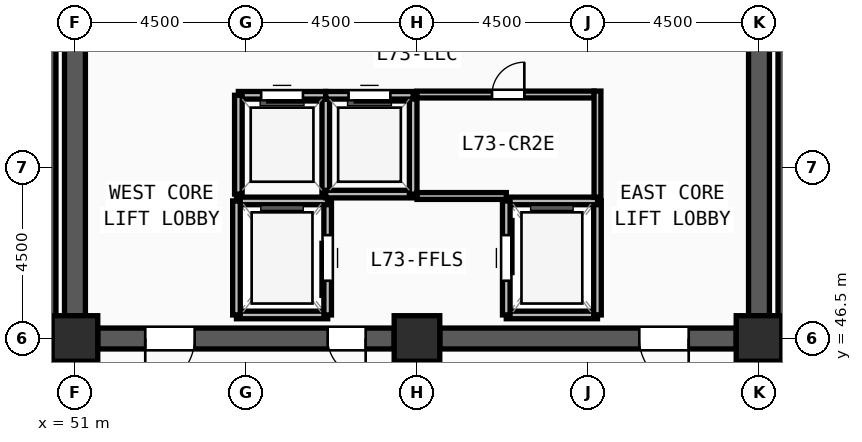
"""IFC4 building model, lengths in metres.
Left out: names, types, materials, properties, quantities, classifications, styles, units other than length and angle.
Written with IfcOpenShell. Run it as: python <this file> out.ifc"""

import sys

from ifc_helpers import new_model, si_unit, direction, frame, frame_2d, origin, origin_2d, place, context, subcontext, project, spatial, rectangle, extrude, source, transform, mapped, element, fill, save


model = new_model("IFC4")
c1 = context("Model", 3, precision=1e-05, world=origin(), true_north=direction((0.0, 1.0)))
c2 = subcontext(c1, "Body", "Model", "MODEL_VIEW")
j1 = project(units=[si_unit("LENGTHUNIT", "METRE"), si_unit("PLANEANGLEUNIT", "RADIAN")], contexts=[c1])
p1 = place(None, origin())
s1 = spatial("IfcSite", under=j1, at=p1, CompositionType="ELEMENT")
p2 = place(p1, origin())
s2 = spatial("IfcBuilding", under=s1, at=p2, CompositionType="ELEMENT")
p3 = place(p2, frame((0.0, 0.0, 282.0)))
s3 = spatial("IfcBuildingStorey", under=s2, at=p3, CompositionType="ELEMENT", Elevation=282.0)
m1 = source(origin(), c2, "Body", "SweptSolid", [
    extrude(rectangle(XDim=1.2, YDim=1.2, at=origin_2d()), origin(), (0.0, 0.0, 1.0), 4.5),
])
for number, where, z_axis, x_axis in (
    (1, (51.0, 46.5, 0.0), (0.0, 0.0, 1.0), (1.0, 0.0, 0.0)),
    (2, (60.0, 46.5, 0.0), (0.0, 0.0, 1.0), (1.0, 0.0, 0.0)),
    (3, (69.0, 46.5, 0.0), (0.0, 0.0, 1.0), (1.0, 0.0, 0.0)),
):
    element("IfcColumn", number, at=place(p3, frame(where, z_axis=z_axis, x_axis=x_axis)), inside=s3, PredefinedType="COLUMN", context=c2, shape_type="MappedRepresentation", body=[
        mapped(m1, transform((0.0, 0.0, 0.0), x_axis=(1.0, 0.0, 0.0), y_axis=(0.0, 1.0, 0.0), z_axis=(0.0, 0.0, 1.0), scale=1.0)),
    ])
p4 = place(p3, frame((69.0, 60.9, 0.0), z_axis=(0.0, 0.0, 1.0), x_axis=(0.0, -1.0, 0.0)))
e4 = element("IfcWall", 4, at=p4, inside=s3, PredefinedType="SHEAR", context=c2, shape_type="SweptSolid", body=[
    extrude(rectangle(XDim=13.8, YDim=0.55, at=frame_2d((6.9, 0.0))), origin(), (0.0, 0.0, 1.0), 4.32),
])
m2 = source(origin(), c2, "Body", "SweptSolid", [
    extrude(rectangle(XDim=1.2, YDim=2.2, at=frame_2d((0.6, 1.1))), frame((0.0, 0.285, 0.0), z_axis=(0.0, -1.0, 0.0), x_axis=(1.0, 0.0, 0.0)), (0.0, 0.0, 1.0), 0.57),
])
p5 = place(p4, frame((1.35, 0.0, 0.0)))
e5 = element("IfcOpeningElement", 5, at=p5, cuts=e4, PredefinedType="OPENING", context=c2, shape_type="MappedRepresentation", body=[
    mapped(m2, transform((0.0, 0.0, 0.0), x_axis=(1.0, 0.0, 0.0), y_axis=(0.0, 1.0, 0.0), z_axis=(0.0, 0.0, 1.0), scale=1.0)),
])
p6 = place(p3, frame((68.4, 46.5, 0.0), z_axis=(0.0, 0.0, 1.0), x_axis=(-1.0, 0.0, 0.0)))
e6 = element("IfcWall", 6, at=p6, inside=s3, PredefinedType="SHEAR", context=c2, shape_type="SweptSolid", body=[
    extrude(rectangle(XDim=7.8, YDim=0.55, at=frame_2d((3.9, 0.0))), origin(), (0.0, 0.0, 1.0), 4.32),
])
m3 = source(origin(), c2, "Body", "SweptSolid", [
    extrude(rectangle(XDim=1.3, YDim=2.2, at=frame_2d((0.65, 1.1))), frame((0.0, 0.285, 0.0), z_axis=(0.0, -1.0, 0.0), x_axis=(1.0, 0.0, 0.0)), (0.0, 0.0, 1.0), 0.57),
])
p7 = place(p6, frame((1.25, 0.0, 0.0)))
e7 = element("IfcOpeningElement", 7, at=p7, cuts=e6, PredefinedType="OPENING", context=c2, shape_type="MappedRepresentation", body=[
    mapped(m3, transform((0.0, 0.0, 0.0), x_axis=(1.0, 0.0, 0.0), y_axis=(0.0, 1.0, 0.0), z_axis=(0.0, 0.0, 1.0), scale=1.0)),
])
p8 = place(p3, frame((59.4, 46.5, 0.0), z_axis=(0.0, 0.0, 1.0), x_axis=(-1.0, 0.0, 0.0)))
e8 = element("IfcWall", 8, at=p8, inside=s3, PredefinedType="SHEAR", context=c2, shape_type="SweptSolid", body=[
    extrude(rectangle(XDim=7.8, YDim=0.55, at=frame_2d((3.9, 0.0))), origin(), (0.0, 0.0, 1.0), 4.32),
])
p9 = place(p8, frame((5.25, 0.0, 0.0)))
e9 = element("IfcOpeningElement", 9, at=p9, cuts=e8, PredefinedType="OPENING", context=c2, shape_type="MappedRepresentation", body=[
    mapped(m3, transform((0.0, 0.0, 0.0), x_axis=(1.0, 0.0, 0.0), y_axis=(0.0, 1.0, 0.0), z_axis=(0.0, 0.0, 1.0), scale=1.0)),
])
m4 = source(origin(), c2, "Body", "SweptSolid", [
    extrude(rectangle(XDim=1.0, YDim=2.2, at=frame_2d((0.5, 1.1))), frame((0.0, 0.285, 0.0), z_axis=(0.0, -1.0, 0.0), x_axis=(1.0, 0.0, 0.0)), (0.0, 0.0, 1.0), 0.57),
])
p10 = place(p8, frame((0.75, 0.0, 0.0)))
e10 = element("IfcOpeningElement", 10, at=p10, cuts=e8, PredefinedType="OPENING", context=c2, shape_type="MappedRepresentation", body=[
    mapped(m4, transform((0.0, 0.0, 0.0), x_axis=(1.0, 0.0, 0.0), y_axis=(0.0, 1.0, 0.0), z_axis=(0.0, 0.0, 1.0), scale=1.0)),
])
p11 = place(p3, frame((51.0, 47.1, 0.0), z_axis=(0.0, 0.0, 1.0), x_axis=(0.0, 1.0, 0.0)))
e11 = element("IfcWall", 11, at=p11, inside=s3, PredefinedType="SHEAR", context=c2, shape_type="SweptSolid", body=[
    extrude(rectangle(XDim=13.8, YDim=0.55, at=frame_2d((6.9, 0.0))), origin(), (0.0, 0.0, 1.0), 4.32),
])
m5 = source(origin(), c2, "Body", "SweptSolid", [
    extrude(rectangle(XDim=1.1, YDim=2.2, at=frame_2d((0.55, 1.1))), frame((0.0, 0.285, 0.0), z_axis=(0.0, -1.0, 0.0), x_axis=(1.0, 0.0, 0.0)), (0.0, 0.0, 1.0), 0.57),
])
p12 = place(p11, frame((11.8, 0.0, 0.0)))
e12 = element("IfcOpeningElement", 12, at=p12, cuts=e11, PredefinedType="OPENING", context=c2, shape_type="MappedRepresentation", body=[
    mapped(m5, transform((0.0, 0.0, 0.0), x_axis=(1.0, 0.0, 0.0), y_axis=(0.0, 1.0, 0.0), z_axis=(0.0, 0.0, 1.0), scale=1.0)),
])
for number, where, z_axis, x_axis in (
    (13, (50.38, 46.7, 0.0), (0.0, 0.0, 1.0), (0.0, 1.0, 0.0)),
    (14, (69.62, 54.52, 0.0), (0.0, 0.0, 1.0), (0.0, -1.0, 0.0)),
):
    element("IfcWall", number, at=place(p3, frame(where, z_axis=z_axis, x_axis=x_axis)), inside=s3, PredefinedType="SOLIDWALL", context=c2, shape_type="SweptSolid", body=[
        extrude(rectangle(XDim=7.82, YDim=0.24, at=frame_2d((3.91, 0.0))), origin(), (0.0, 0.0, 1.0), 4.32),
    ])
p13 = place(p3, frame((55.25, 47.12, 0.0), z_axis=(0.0, 0.0, 1.0), x_axis=(1.0, 0.0, 0.0)))
e15 = element("IfcWall", 15, at=p13, inside=s3, PredefinedType="SOLIDWALL", context=c2, shape_type="SweptSolid", body=[
    extrude(rectangle(XDim=2.4, YDim=0.2, at=frame_2d((1.2, 0.0))), origin(), (0.0, 0.0, 1.0), 4.32),
])
p14 = place(p3, frame((57.65, 47.12, 0.0), z_axis=(0.0, 0.0, 1.0), x_axis=(0.0, 1.0, 0.0)))
e16 = element("IfcWall", 16, at=p14, inside=s3, PredefinedType="SOLIDWALL", context=c2, shape_type="SweptSolid", body=[
    extrude(rectangle(XDim=3.0, YDim=0.2, at=frame_2d((1.5, 0.0))), origin(), (0.0, 0.0, 1.0), 4.32),
])
m6 = source(origin(), c2, "Body", "SweptSolid", [
    extrude(rectangle(XDim=1.2, YDim=2.3, at=frame_2d((0.6, 1.15))), frame((0.0, 0.11, 0.0), z_axis=(0.0, -1.0, 0.0), x_axis=(1.0, 0.0, 0.0)), (0.0, 0.0, 1.0), 0.22),
])
p15 = place(p14, frame((0.9, 0.0, 0.0)))
e17 = element("IfcOpeningElement", 17, at=p15, cuts=e16, PredefinedType="OPENING", context=c2, shape_type="MappedRepresentation", body=[
    mapped(m6, transform((0.0, 0.0, 0.0), x_axis=(1.0, 0.0, 0.0), y_axis=(0.0, 1.0, 0.0), z_axis=(0.0, 0.0, 1.0), scale=1.0)),
])
p16 = place(p3, frame((57.65, 50.12, 0.0), z_axis=(0.0, 0.0, 1.0), x_axis=(-1.0, 0.0, 0.0)))
e18 = element("IfcWall", 18, at=p16, inside=s3, PredefinedType="SOLIDWALL", context=c2, shape_type="SweptSolid", body=[
    extrude(rectangle(XDim=2.4, YDim=0.2, at=frame_2d((1.2, 0.0))), origin(), (0.0, 0.0, 1.0), 4.32),
])
p17 = place(p3, frame((55.25, 50.12, 0.0), z_axis=(0.0, 0.0, 1.0), x_axis=(0.0, -1.0, 0.0)))
e19 = element("IfcWall", 19, at=p17, inside=s3, PredefinedType="SOLIDWALL", context=c2, shape_type="SweptSolid", body=[
    extrude(rectangle(XDim=3.0, YDim=0.2, at=frame_2d((1.5, 0.0))), origin(), (0.0, 0.0, 1.0), 4.32),
])
p18 = place(p3, frame((62.35, 47.12, 0.0), z_axis=(0.0, 0.0, 1.0), x_axis=(1.0, 0.0, 0.0)))
e20 = element("IfcWall", 20, at=p18, inside=s3, PredefinedType="SOLIDWALL", context=c2, shape_type="SweptSolid", body=[
    extrude(rectangle(XDim=2.4, YDim=0.2, at=frame_2d((1.2, 0.0))), origin(), (0.0, 0.0, 1.0), 4.32),
])
p19 = place(p3, frame((64.75, 47.12, 0.0), z_axis=(0.0, 0.0, 1.0), x_axis=(0.0, 1.0, 0.0)))
e21 = element("IfcWall", 21, at=p19, inside=s3, PredefinedType="SOLIDWALL", context=c2, shape_type="SweptSolid", body=[
    extrude(rectangle(XDim=3.0, YDim=0.2, at=frame_2d((1.5, 0.0))), origin(), (0.0, 0.0, 1.0), 4.32),
])
p20 = place(p3, frame((64.75, 50.12, 0.0), z_axis=(0.0, 0.0, 1.0), x_axis=(-1.0, 0.0, 0.0)))
e22 = element("IfcWall", 22, at=p20, inside=s3, PredefinedType="SOLIDWALL", context=c2, shape_type="SweptSolid", body=[
    extrude(rectangle(XDim=2.4, YDim=0.2, at=frame_2d((1.2, 0.0))), origin(), (0.0, 0.0, 1.0), 4.32),
])
p21 = place(p3, frame((62.35, 50.12, 0.0), z_axis=(0.0, 0.0, 1.0), x_axis=(0.0, -1.0, 0.0)))
e23 = element("IfcWall", 23, at=p21, inside=s3, PredefinedType="SOLIDWALL", context=c2, shape_type="SweptSolid", body=[
    extrude(rectangle(XDim=3.0, YDim=0.2, at=frame_2d((1.5, 0.0))), origin(), (0.0, 0.0, 1.0), 4.32),
])
p22 = place(p21, frame((0.9, 0.0, 0.0)))
e24 = element("IfcOpeningElement", 24, at=p22, cuts=e23, PredefinedType="OPENING", context=c2, shape_type="MappedRepresentation", body=[
    mapped(m6, transform((0.0, 0.0, 0.0), x_axis=(1.0, 0.0, 0.0), y_axis=(0.0, 1.0, 0.0), z_axis=(0.0, 0.0, 1.0), scale=1.0)),
])
p23 = place(p3, frame((57.6, 50.3, 0.0), z_axis=(0.0, 0.0, 1.0), x_axis=(0.0, 1.0, 0.0)))
e25 = element("IfcWall", 25, at=p23, inside=s3, PredefinedType="SOLIDWALL", context=c2, shape_type="SweptSolid", body=[
    extrude(rectangle(XDim=2.6, YDim=0.2, at=frame_2d((1.3, 0.0))), origin(), (0.0, 0.0, 1.0), 4.32),
])
p24 = place(p3, frame((57.6, 52.9, 0.0), z_axis=(0.0, 0.0, 1.0), x_axis=(-1.0, 0.0, 0.0)))
e26 = element("IfcWall", 26, at=p24, inside=s3, PredefinedType="SOLIDWALL", context=c2, shape_type="SweptSolid", body=[
    extrude(rectangle(XDim=2.3, YDim=0.2, at=frame_2d((1.15, 0.0))), origin(), (0.0, 0.0, 1.0), 4.32),
])
m7 = source(origin(), c2, "Body", "SweptSolid", [
    extrude(rectangle(XDim=1.1, YDim=2.2, at=frame_2d((0.55, 1.1))), frame((0.0, 0.11, 0.0), z_axis=(0.0, -1.0, 0.0), x_axis=(1.0, 0.0, 0.0)), (0.0, 0.0, 1.0), 0.22),
])
p25 = place(p24, frame((0.6, 0.0, 0.0)))
e27 = element("IfcOpeningElement", 27, at=p25, cuts=e26, PredefinedType="OPENING", context=c2, shape_type="MappedRepresentation", body=[
    mapped(m7, transform((0.0, 0.0, 0.0), x_axis=(1.0, 0.0, 0.0), y_axis=(0.0, 1.0, 0.0), z_axis=(0.0, 0.0, 1.0), scale=1.0)),
])
p26 = place(p3, frame((55.3, 52.9, 0.0), z_axis=(0.0, 0.0, 1.0), x_axis=(0.0, -1.0, 0.0)))
e28 = element("IfcWall", 28, at=p26, inside=s3, PredefinedType="SOLIDWALL", context=c2, shape_type="SweptSolid", body=[
    extrude(rectangle(XDim=2.6, YDim=0.2, at=frame_2d((1.3, 0.0))), origin(), (0.0, 0.0, 1.0), 4.32),
])
p27 = place(p3, frame((57.6, 50.3, 0.0), z_axis=(0.0, 0.0, 1.0), x_axis=(1.0, 0.0, 0.0)))
e29 = element("IfcWall", 29, at=p27, inside=s3, PredefinedType="SOLIDWALL", context=c2, shape_type="SweptSolid", body=[
    extrude(rectangle(XDim=2.3, YDim=0.2, at=frame_2d((1.15, 0.0))), origin(), (0.0, 0.0, 1.0), 4.32),
])
p28 = place(p3, frame((59.9, 50.3, 0.0), z_axis=(0.0, 0.0, 1.0), x_axis=(0.0, 1.0, 0.0)))
e30 = element("IfcWall", 30, at=p28, inside=s3, PredefinedType="SOLIDWALL", context=c2, shape_type="SweptSolid", body=[
    extrude(rectangle(XDim=2.6, YDim=0.2, at=frame_2d((1.3, 0.0))), origin(), (0.0, 0.0, 1.0), 4.32),
])
p29 = place(p3, frame((59.9, 52.9, 0.0), z_axis=(0.0, 0.0, 1.0), x_axis=(-1.0, 0.0, 0.0)))
e31 = element("IfcWall", 31, at=p29, inside=s3, PredefinedType="SOLIDWALL", context=c2, shape_type="SweptSolid", body=[
    extrude(rectangle(XDim=2.3, YDim=0.2, at=frame_2d((1.15, 0.0))), origin(), (0.0, 0.0, 1.0), 4.32),
])
p30 = place(p29, frame((0.6, 0.0, 0.0)))
e32 = element("IfcOpeningElement", 32, at=p30, cuts=e31, PredefinedType="OPENING", context=c2, shape_type="MappedRepresentation", body=[
    mapped(m7, transform((0.0, 0.0, 0.0), x_axis=(1.0, 0.0, 0.0), y_axis=(0.0, 1.0, 0.0), z_axis=(0.0, 0.0, 1.0), scale=1.0)),
])
p31 = place(p3, frame((60.0, 52.92, 0.0), z_axis=(0.0, 0.0, 1.0), x_axis=(1.0, 0.0, 0.0)))
e33 = element("IfcWall", 33, at=p31, inside=s3, PredefinedType="PARTITIONING", context=c2, shape_type="SweptSolid", body=[
    extrude(rectangle(XDim=4.66, YDim=0.18, at=frame_2d((2.33, 0.0))), origin(), (0.0, 0.0, 1.0), 4.32),
])
m8 = source(origin(), c2, "Body", "SweptSolid", [
    extrude(rectangle(XDim=0.85, YDim=2.1, at=frame_2d((0.425, 1.05))), frame((0.0, 0.1, 0.0), z_axis=(0.0, -1.0, 0.0), x_axis=(1.0, 0.0, 0.0)), (0.0, 0.0, 1.0), 0.2),
])
p32 = place(p31, frame((1.975, 0.0, 0.0)))
e34 = element("IfcOpeningElement", 34, at=p32, cuts=e33, PredefinedType="OPENING", context=c2, shape_type="MappedRepresentation", body=[
    mapped(m8, transform((0.0, 0.0, 0.0), x_axis=(1.0, 0.0, 0.0), y_axis=(0.0, 1.0, 0.0), z_axis=(0.0, 0.0, 1.0), scale=1.0)),
])
p33 = place(p3, frame((64.75, 50.22, 0.0), z_axis=(0.0, 0.0, 1.0), x_axis=(0.0, 1.0, 0.0)))
e35 = element("IfcWall", 35, at=p33, inside=s3, PredefinedType="PARTITIONING", context=c2, shape_type="SweptSolid", body=[
    extrude(rectangle(XDim=2.79, YDim=0.18, at=frame_2d((1.395, 0.0))), origin(), (0.0, 0.0, 1.0), 4.32),
])
p34 = place(p3, frame((60.0, 50.25, 0.0), z_axis=(0.0, 0.0, 1.0), x_axis=(1.0, 0.0, 0.0)))
e36 = element("IfcWall", 36, at=p34, inside=s3, PredefinedType="PARTITIONING", context=c2, shape_type="SweptSolid", body=[
    extrude(rectangle(XDim=2.35, YDim=0.18, at=frame_2d((1.175, 0.0))), origin(), (0.0, 0.0, 1.0), 4.32),
])
m9 = source(origin(), c2, "Body", "SweptSolid", [
    extrude(rectangle(XDim=1.3, YDim=2.2, at=frame_2d((0.65, 1.1))), frame((0.0, 0.025, 0.0), z_axis=(0.0, -1.0, 0.0), x_axis=(1.0, 0.0, 0.0)), (0.0, 0.0, 1.0), 0.05),
])
p35 = place(p9, origin())
e37 = element("IfcDoor", 37, at=p35, inside=s3, OperationType="SINGLE_SWING_RIGHT", PredefinedType="DOOR", context=c2, shape_type="MappedRepresentation", body=[
    mapped(m9, transform((0.0, 0.0, 0.0), x_axis=(1.0, 0.0, 0.0), y_axis=(0.0, 1.0, 0.0), z_axis=(0.0, 0.0, 1.0), scale=1.0)),
])
fill(e9, e37)
m10 = source(origin(), c2, "Body", "SweptSolid", [
    extrude(rectangle(XDim=1.0, YDim=2.2, at=frame_2d((0.5, 1.1))), frame((0.0, 0.025, 0.0), z_axis=(0.0, -1.0, 0.0), x_axis=(1.0, 0.0, 0.0)), (0.0, 0.0, 1.0), 0.05),
])
p36 = place(p10, origin())
e38 = element("IfcDoor", 38, at=p36, inside=s3, OperationType="SINGLE_SWING_LEFT", PredefinedType="DOOR", context=c2, shape_type="MappedRepresentation", body=[
    mapped(m10, transform((0.0, 0.0, 0.0), x_axis=(1.0, 0.0, 0.0), y_axis=(0.0, 1.0, 0.0), z_axis=(0.0, 0.0, 1.0), scale=1.0)),
])
fill(e10, e38)
p37 = place(p7, origin())
e39 = element("IfcDoor", 39, at=p37, inside=s3, OperationType="SINGLE_SWING_LEFT", PredefinedType="DOOR", context=c2, shape_type="MappedRepresentation", body=[
    mapped(m9, transform((0.0, 0.0, 0.0), x_axis=(1.0, 0.0, 0.0), y_axis=(0.0, 1.0, 0.0), z_axis=(0.0, 0.0, 1.0), scale=1.0)),
])
fill(e7, e39)
m11 = source(origin(), c2, "Body", "SweptSolid", [
    extrude(rectangle(XDim=1.2, YDim=2.3, at=frame_2d((0.6, 1.15))), frame((0.0, 0.025, 0.0), z_axis=(0.0, -1.0, 0.0), x_axis=(1.0, 0.0, 0.0)), (0.0, 0.0, 1.0), 0.05),
])
p38 = place(p15, origin())
e40 = element("IfcDoor", 40, at=p38, inside=s3, OperationType="SLIDING_TO_LEFT", PredefinedType="DOOR", context=c2, shape_type="MappedRepresentation", body=[
    mapped(m11, transform((0.0, 0.0, 0.0), x_axis=(1.0, 0.0, 0.0), y_axis=(0.0, 1.0, 0.0), z_axis=(0.0, 0.0, 1.0), scale=1.0)),
])
fill(e17, e40)
p39 = place(p22, origin())
e41 = element("IfcDoor", 41, at=p39, inside=s3, OperationType="SLIDING_TO_LEFT", PredefinedType="DOOR", context=c2, shape_type="MappedRepresentation", body=[
    mapped(m11, transform((0.0, 0.0, 0.0), x_axis=(1.0, 0.0, 0.0), y_axis=(0.0, 1.0, 0.0), z_axis=(0.0, 0.0, 1.0), scale=1.0)),
])
fill(e24, e41)
m12 = source(origin(), c2, "Body", "SweptSolid", [
    extrude(rectangle(XDim=1.1, YDim=2.2, at=frame_2d((0.55, 1.1))), frame((0.0, 0.025, 0.0), z_axis=(0.0, -1.0, 0.0), x_axis=(1.0, 0.0, 0.0)), (0.0, 0.0, 1.0), 0.05),
])
p40 = place(p25, origin())
e42 = element("IfcDoor", 42, at=p40, inside=s3, OperationType="SLIDING_TO_LEFT", PredefinedType="DOOR", context=c2, shape_type="MappedRepresentation", body=[
    mapped(m12, transform((0.0, 0.0, 0.0), x_axis=(1.0, 0.0, 0.0), y_axis=(0.0, 1.0, 0.0), z_axis=(0.0, 0.0, 1.0), scale=1.0)),
])
fill(e27, e42)
p41 = place(p30, origin())
e43 = element("IfcDoor", 43, at=p41, inside=s3, OperationType="SLIDING_TO_LEFT", PredefinedType="DOOR", context=c2, shape_type="MappedRepresentation", body=[
    mapped(m12, transform((0.0, 0.0, 0.0), x_axis=(1.0, 0.0, 0.0), y_axis=(0.0, 1.0, 0.0), z_axis=(0.0, 0.0, 1.0), scale=1.0)),
])
fill(e32, e43)
m13 = source(origin(), c2, "Body", "SweptSolid", [
    extrude(rectangle(XDim=0.85, YDim=2.1, at=frame_2d((0.425, 1.05))), frame((0.0, 0.025, 0.0), z_axis=(0.0, -1.0, 0.0), x_axis=(1.0, 0.0, 0.0)), (0.0, 0.0, 1.0), 0.05),
])
p42 = place(p32, origin())
e44 = element("IfcDoor", 44, at=p42, inside=s3, OperationType="SINGLE_SWING_RIGHT", PredefinedType="DOOR", context=c2, shape_type="MappedRepresentation", body=[
    mapped(m13, transform((0.0, 0.0, 0.0), x_axis=(1.0, 0.0, 0.0), y_axis=(0.0, 1.0, 0.0), z_axis=(0.0, 0.0, 1.0), scale=1.0)),
])
fill(e34, e44)
save(model, sys.argv[1])
